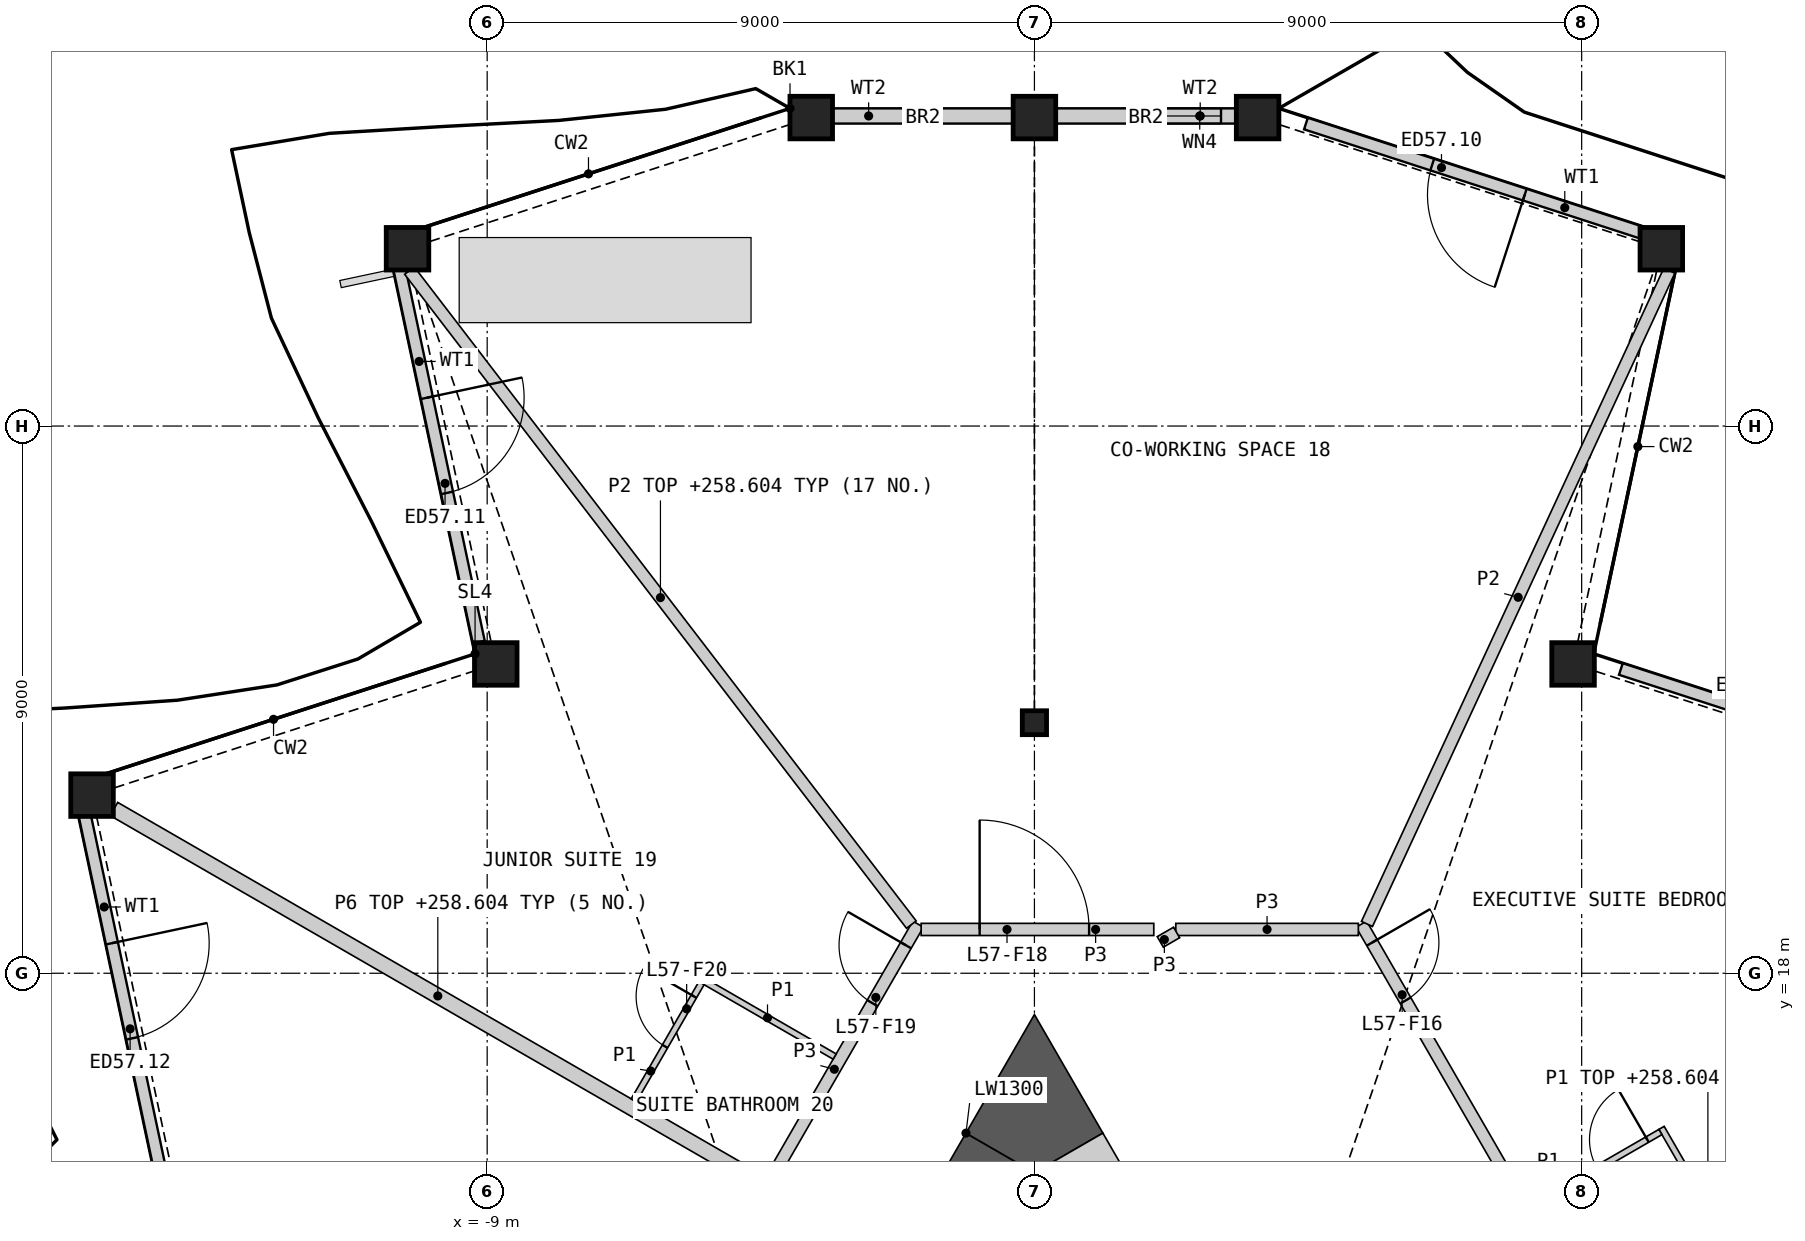
"""IFC4 building model, lengths in metres.
Left out: names, types, materials, properties, quantities, classifications, styles, units other than length and angle.
Written with IfcOpenShell. Run it as: python <this file> out.ifc"""

import sys

from ifc_helpers import new_model, si_unit, direction, frame, frame_2d, origin, origin_2d, place, context, subcontext, project, spatial, polyline, rectangle, hollow_rectangle, i_section, outline, extrude, element, fill, save


model = new_model("IFC4")
c1 = context("Model", 3, precision=1e-05, world=origin(), true_north=direction((0.0, 1.0)))
c2 = subcontext(c1, "Body", "Model", "MODEL_VIEW")
j1 = project(units=[si_unit("LENGTHUNIT", "METRE"), si_unit("PLANEANGLEUNIT", "RADIAN")], contexts=[c1])
p1 = place(None, origin())
s1 = spatial("IfcSite", under=j1, at=p1, CompositionType="ELEMENT")
p2 = place(p1, origin())
s2 = spatial("IfcBuilding", under=s1, at=p2, CompositionType="ELEMENT")
p3 = place(p2, frame((0.0, 0.0, 256.2)))
s3 = spatial("IfcBuildingStorey", under=s2, at=p3, CompositionType="ELEMENT", Elevation=256.2)
for number, where, z_axis, x_axis in (
    (1, (8.859, 23.087, 0.0), (0.0, 0.0, 1.0), (1.0, 0.0, 0.0)),
    (2, (10.31, 29.916, 0.0), (0.0, 0.0, 1.0), (1.0, 0.0, 0.0)),
    (3, (3.67, 32.073, 0.0), (0.0, 0.0, 1.0), (1.0, 0.0, 0.0)),
    (4, (0.0, 32.073, 0.0), (0.0, 0.0, 1.0), (1.0, 0.0, 0.0)),
    (5, (-3.67, 32.073, 0.0), (0.0, 0.0, 1.0), (1.0, 0.0, 0.0)),
    (6, (-10.31, 29.916, 0.0), (0.0, 0.0, 1.0), (1.0, 0.0, 0.0)),
    (7, (-8.859, 23.087, 0.0), (0.0, 0.0, 1.0), (1.0, 0.0, 0.0)),
    (8, (-15.499, 20.93, 0.0), (0.0, 0.0, 1.0), (1.0, 0.0, 0.0)),
):
    element("IfcColumn", number, at=place(p3, frame(where, z_axis=z_axis, x_axis=x_axis)), inside=s3, PredefinedType="COLUMN", context=c2, shape_type="SweptSolid", body=[
        extrude(hollow_rectangle(XDim=0.7, YDim=0.7, WallThickness=0.045, at=origin_2d()), origin(), (0.0, 0.0, 1.0), 3.6),
    ])
p4 = place(p3, frame((0.0, 22.121, 0.0), z_axis=(0.0, 0.0, 1.0), x_axis=(1.0, 0.0, 0.0)))
e9 = element("IfcColumn", 9, at=p4, inside=s3, PredefinedType="COLUMN", context=c2, shape_type="SweptSolid", body=[
    extrude(i_section(OverallWidth=0.399, OverallDepth=0.393, WebThickness=0.023, FlangeThickness=0.037, at=origin_2d()), origin(), (0.0, 0.0, 1.0), 3.6),
])
p5 = place(p3, frame((15.321, 21.159, 0.0), z_axis=(0.0, 0.0, 1.0), x_axis=(-0.951053307318, 0.309026870418, 0.0)))
e10 = element("IfcWall", 10, at=p5, inside=s3, PredefinedType="SOLIDWALL", context=c2, shape_type="SweptSolid", body=[
    extrude(rectangle(XDim=5.968, YDim=0.2, at=frame_2d((2.984, 0.0))), origin(), (0.0, 0.0, 1.0), 2.701),
])
p6 = place(p5, frame((2.184, 0.0, 0.0)))
e11 = element("IfcOpeningElement", 11, at=p6, cuts=e10, PredefinedType="OPENING", context=c2, shape_type="SweptSolid", body=[
    extrude(rectangle(XDim=1.6, YDim=2.4, at=frame_2d((0.8, 1.2))), frame((0.0, 0.11, 0.0), z_axis=(0.0, -1.0, 0.0), x_axis=(1.0, 0.0, 0.0)), (0.0, 0.0, 1.0), 0.22),
])
p7 = place(p3, frame((10.141, 30.131, 0.0), z_axis=(0.0, 0.0, 1.0), x_axis=(-0.951049400374, 0.309038894069, 0.0)))
e12 = element("IfcWall", 12, at=p7, inside=s3, PredefinedType="SOLIDWALL", context=c2, shape_type="SweptSolid", body=[
    extrude(rectangle(XDim=5.968, YDim=0.2, at=frame_2d((2.984, 0.0))), origin(), (0.0, 0.0, 1.0), 2.701),
])
p8 = place(p7, frame((2.184, 0.0, 0.0)))
e13 = element("IfcOpeningElement", 13, at=p8, cuts=e12, PredefinedType="OPENING", context=c2, shape_type="SweptSolid", body=[
    extrude(rectangle(XDim=1.6, YDim=2.4, at=frame_2d((0.8, 1.2))), frame((0.0, 0.11, 0.0), z_axis=(0.0, -1.0, 0.0), x_axis=(1.0, 0.0, 0.0)), (0.0, 0.0, 1.0), 0.22),
])
p9 = place(p3, frame((3.519, 32.1, 0.0), z_axis=(0.0, 0.0, 1.0), x_axis=(-1.0, 0.0, 0.0)))
e14 = element("IfcWall", 14, at=p9, inside=s3, PredefinedType="SOLIDWALL", context=c2, shape_type="SweptSolid", body=[
    extrude(rectangle(XDim=3.169, YDim=0.25, at=frame_2d((1.584, 0.0))), origin(), (0.0, 0.0, 1.0), 2.701),
])
p10 = place(p9, frame((0.45, 0.0, 1.8)))
e15 = element("IfcOpeningElement", 15, at=p10, cuts=e14, PredefinedType="OPENING", context=c2, shape_type="SweptSolid", body=[
    extrude(rectangle(XDim=1.4, YDim=0.7, at=frame_2d((0.7, 0.35))), frame((0.0, 0.135, 0.0), z_axis=(0.0, -1.0, 0.0), x_axis=(1.0, 0.0, 0.0)), (0.0, 0.0, 1.0), 0.27),
])
p11 = place(p3, frame((-0.35, 32.1, 0.0), z_axis=(0.0, 0.0, 1.0), x_axis=(-1.0, 0.0, 0.0)))
e16 = element("IfcWall", 16, at=p11, inside=s3, PredefinedType="SOLIDWALL", context=c2, shape_type="SweptSolid", body=[
    extrude(rectangle(XDim=3.169, YDim=0.25, at=frame_2d((1.584, 0.0))), origin(), (0.0, 0.0, 1.0), 2.701),
])
p12 = place(p3, frame((-10.446, 29.602, 0.0), z_axis=(0.0, 0.0, 1.0), x_axis=(0.207926028339, -0.97814455309, 0.0)))
e17 = element("IfcWall", 17, at=p12, inside=s3, PredefinedType="SOLIDWALL", context=c2, shape_type="SweptSolid", body=[
    extrude(rectangle(XDim=6.293, YDim=0.2, at=frame_2d((3.147, 0.0))), origin(), (0.0, 0.0, 1.0), 2.701),
])
p13 = place(p12, frame((2.184, 0.0, 0.0)))
e18 = element("IfcOpeningElement", 18, at=p13, cuts=e17, PredefinedType="OPENING", context=c2, shape_type="SweptSolid", body=[
    extrude(rectangle(XDim=1.6, YDim=2.4, at=frame_2d((0.8, 1.2))), frame((0.0, 0.11, 0.0), z_axis=(0.0, -1.0, 0.0), x_axis=(1.0, 0.0, 0.0)), (0.0, 0.0, 1.0), 0.22),
])
p14 = place(p3, frame((-15.626, 20.631, 0.0), z_axis=(0.0, 0.0, 1.0), x_axis=(0.207882853761, -0.978153729795, 0.0)))
e19 = element("IfcWall", 19, at=p14, inside=s3, PredefinedType="SOLIDWALL", context=c2, shape_type="SweptSolid", body=[
    extrude(rectangle(XDim=6.301, YDim=0.2, at=frame_2d((3.15, 0.0))), origin(), (0.0, 0.0, 1.0), 2.701),
])
p15 = place(p14, frame((2.184, 0.0, 0.0)))
e20 = element("IfcOpeningElement", 20, at=p15, cuts=e19, PredefinedType="OPENING", context=c2, shape_type="SweptSolid", body=[
    extrude(rectangle(XDim=1.6, YDim=2.4, at=frame_2d((0.8, 1.2))), frame((0.0, 0.11, 0.0), z_axis=(0.0, -1.0, 0.0), x_axis=(1.0, 0.0, 0.0)), (0.0, 0.0, 1.0), 0.22),
])
p16 = place(p3, frame((-0.563, 15.045, 0.0), z_axis=(0.0, 0.0, 1.0), x_axis=(-0.499982995661, -0.866035221021, 0.0)))
e21 = element("IfcWall", 21, at=p16, inside=s3, PredefinedType="SHEAR", context=c2, shape_type="SweptSolid", body=[
    extrude(rectangle(XDim=5.164, YDim=1.3, at=frame_2d((2.582, 0.0))), origin(), (0.0, 0.0, 1.0), 3.25),
])
p17 = place(p3, origin())
e22 = element("IfcWall", 22, at=p17, inside=s3, PredefinedType="SHEAR", context=c2, shape_type="SweptSolid", body=[
    extrude(outline(polyline([(-1.126, 15.371), (0.0, 17.321), (1.126, 15.371), (0.0, 14.72), (-1.126, 15.371)])), origin(), (0.0, 0.0, 1.0), 3.25),
])
p18 = place(p3, frame((2.14, 12.313, 0.0), z_axis=(0.0, 0.0, 1.0), x_axis=(-0.499968102766, 0.866043818878, 0.0)))
e23 = element("IfcWall", 23, at=p18, inside=s3, PredefinedType="SHEAR", context=c2, shape_type="SweptSolid", body=[
    extrude(rectangle(XDim=3.155, YDim=1.3, at=frame_2d((1.577, 0.0))), origin(), (0.0, 0.0, 1.0), 3.25),
])
p19 = place(p18, frame((0.6, 0.0, 0.0)))
e24 = element("IfcOpeningElement", 24, at=p19, cuts=e23, PredefinedType="OPENING", context=c2, shape_type="SweptSolid", body=[
    extrude(rectangle(XDim=1.0, YDim=2.1, at=frame_2d((0.5, 1.05))), frame((0.0, 0.66, 0.0), z_axis=(0.0, -1.0, 0.0), x_axis=(1.0, 0.0, 0.0)), (0.0, 0.0, 1.0), 1.32),
])
p20 = place(p3, frame((5.377, 18.807, 0.0), z_axis=(0.0, 0.0, 1.0), x_axis=(0.499999852422, -0.866025488988, 0.0)))
e25 = element("IfcWall", 25, at=p20, inside=s3, PredefinedType="PARTITIONING", context=c2, shape_type="SweptSolid", body=[
    extrude(rectangle(XDim=27.198, YDim=0.2, at=frame_2d((13.599, 0.0))), origin(), (0.0, 0.0, 1.0), 3.25),
])
p21 = place(p20, frame((25.096, 0.0, 0.0)))
e26 = element("IfcOpeningElement", 26, at=p21, cuts=e25, PredefinedType="OPENING", context=c2, shape_type="SweptSolid", body=[
    extrude(rectangle(XDim=0.95, YDim=2.1, at=frame_2d((0.475, 1.05))), frame((0.0, 0.11, 0.0), z_axis=(0.0, -1.0, 0.0), x_axis=(1.0, 0.0, 0.0)), (0.0, 0.0, 1.0), 0.22),
])
p22 = place(p20, frame((19.122, 0.0, 0.0)))
e27 = element("IfcOpeningElement", 27, at=p22, cuts=e25, PredefinedType="OPENING", context=c2, shape_type="SweptSolid", body=[
    extrude(rectangle(XDim=1.0, YDim=2.1, at=frame_2d((0.5, 1.05))), frame((0.0, 0.11, 0.0), z_axis=(0.0, -1.0, 0.0), x_axis=(1.0, 0.0, 0.0)), (0.0, 0.0, 1.0), 0.22),
])
p23 = place(p20, frame((17.115, 0.0, 0.0)))
e28 = element("IfcOpeningElement", 28, at=p23, cuts=e25, PredefinedType="OPENING", context=c2, shape_type="SweptSolid", body=[
    extrude(rectangle(XDim=1.1, YDim=2.1, at=frame_2d((0.55, 1.05))), frame((0.0, 0.11, 0.0), z_axis=(0.0, -1.0, 0.0), x_axis=(1.0, 0.0, 0.0)), (0.0, 0.0, 1.0), 0.22),
])
p24 = place(p20, frame((0.35, 0.0, 0.0)))
e29 = element("IfcOpeningElement", 29, at=p24, cuts=e25, PredefinedType="OPENING", context=c2, shape_type="SweptSolid", body=[
    extrude(rectangle(XDim=1.1, YDim=2.1, at=frame_2d((0.55, 1.05))), frame((0.0, 0.11, 0.0), z_axis=(0.0, -1.0, 0.0), x_axis=(1.0, 0.0, 0.0)), (0.0, 0.0, 1.0), 0.22),
])
p25 = place(p3, frame((-15.138, 20.702, 0.0), z_axis=(0.0, 0.0, 1.0), x_axis=(0.86602627735, -0.499998486937, 0.0)))
e30 = element("IfcWall", 30, at=p25, inside=s3, PredefinedType="PARTITIONING", context=c2, shape_type="SweptSolid", body=[
    extrude(rectangle(XDim=12.301, YDim=0.25, at=frame_2d((6.15, 0.0))), origin(), (0.0, 0.0, 1.0), 2.404),
])
p26 = place(p3, frame((-4.668, 14.035, 0.0), z_axis=(0.0, 0.0, 1.0), x_axis=(0.499984524817, 0.866034338201, 0.0)))
e31 = element("IfcWall", 31, at=p26, inside=s3, PredefinedType="PARTITIONING", context=c2, shape_type="SweptSolid", body=[
    extrude(rectangle(XDim=5.51, YDim=0.2, at=frame_2d((2.755, 0.0))), origin(), (0.0, 0.0, 1.0), 3.25),
])
p27 = place(p26, frame((4.01, 0.0, 0.0)))
e32 = element("IfcOpeningElement", 32, at=p27, cuts=e31, PredefinedType="OPENING", context=c2, shape_type="SweptSolid", body=[
    extrude(rectangle(XDim=1.1, YDim=2.1, at=frame_2d((0.55, 1.05))), frame((0.0, 0.11, 0.0), z_axis=(0.0, -1.0, 0.0), x_axis=(1.0, 0.0, 0.0)), (0.0, 0.0, 1.0), 0.22),
])
p28 = place(p3, frame((-1.863, 18.72, 0.0), z_axis=(0.0, 0.0, 1.0), x_axis=(1.0, 0.0, 0.0)))
e33 = element("IfcWall", 33, at=p28, inside=s3, PredefinedType="PARTITIONING", context=c2, shape_type="SweptSolid", body=[
    extrude(rectangle(XDim=3.826, YDim=0.2, at=frame_2d((1.913, 0.0))), origin(), (0.0, 0.0, 1.0), 3.25),
])
p29 = place(p28, frame((0.962, 0.0, 0.0)))
e34 = element("IfcOpeningElement", 34, at=p29, cuts=e33, PredefinedType="OPENING", context=c2, shape_type="SweptSolid", body=[
    extrude(rectangle(XDim=1.8, YDim=2.1, at=frame_2d((0.9, 1.05))), frame((0.0, 0.11, 0.0), z_axis=(0.0, -1.0, 0.0), x_axis=(1.0, 0.0, 0.0)), (0.0, 0.0, 1.0), 0.22),
])
p30 = place(p3, frame((2.325, 18.72, 0.0), z_axis=(0.0, 0.0, 1.0), x_axis=(1.0, 0.0, 0.0)))
e35 = element("IfcWall", 35, at=p30, inside=s3, PredefinedType="PARTITIONING", context=c2, shape_type="SweptSolid", body=[
    extrude(rectangle(XDim=3.002, YDim=0.2, at=frame_2d((1.501, 0.0))), origin(), (0.0, 0.0, 1.0), 3.25),
])
p31 = place(p3, frame((2.07, 18.515, 0.0), z_axis=(0.0, 0.0, 1.0), x_axis=(0.866054481515, 0.499949632511, 0.0)))
e36 = element("IfcWall", 36, at=p31, inside=s3, PredefinedType="PARTITIONING", context=c2, shape_type="SweptSolid", body=[
    extrude(rectangle(XDim=0.31, YDim=0.2, at=frame_2d((0.155, 0.0))), origin(), (0.0, 0.0, 1.0), 3.25),
])
p32 = place(p3, frame((-10.277, 29.556, 0.0), z_axis=(0.0, 0.0, 1.0), x_axis=(0.60876001101, -0.793354428358, 0.0)))
e37 = element("IfcWall", 37, at=p32, inside=s3, PredefinedType="PARTITIONING", context=c2, shape_type="SweptSolid", body=[
    extrude(rectangle(XDim=13.558, YDim=0.2, at=frame_2d((6.779, 0.0))), origin(), (0.0, 0.0, 1.0), 2.404),
])
p33 = place(p3, frame((5.469, 18.811, 0.0), z_axis=(0.0, 0.0, 1.0), x_axis=(0.419996836618, 0.907525568362, 0.0)))
e38 = element("IfcWall", 38, at=p33, inside=s3, PredefinedType="PARTITIONING", context=c2, shape_type="SweptSolid", body=[
    extrude(rectangle(XDim=11.84, YDim=0.2, at=frame_2d((5.92, 0.0))), origin(), (0.0, 0.0, 1.0), 2.404),
])
p34 = place(p3, frame((10.313, 15.457, 0.0), z_axis=(0.0, 0.0, 1.0), x_axis=(0.499978833458, -0.866037623948, 0.0)))
e39 = element("IfcWall", 39, at=p34, inside=s3, PredefinedType="PARTITIONING", context=c2, shape_type="SweptSolid", body=[
    extrude(rectangle(XDim=6.1, YDim=0.1, at=frame_2d((3.05, 0.0))), origin(), (0.0, 0.0, 1.0), 2.404),
])
p35 = place(p3, frame((8.173, 14.164, 0.0), z_axis=(0.0, 0.0, 1.0), x_axis=(0.866014668023, 0.500018594424, 0.0)))
e40 = element("IfcWall", 40, at=p35, inside=s3, PredefinedType="PARTITIONING", context=c2, shape_type="SweptSolid", body=[
    extrude(rectangle(XDim=2.45, YDim=0.1, at=frame_2d((1.225, 0.0))), origin(), (0.0, 0.0, 1.0), 2.404),
])
p36 = place(p35, frame((1.25, 0.0, 0.0)))
e41 = element("IfcOpeningElement", 41, at=p36, cuts=e40, PredefinedType="OPENING", context=c2, shape_type="SweptSolid", body=[
    extrude(rectangle(XDim=0.95, YDim=2.1, at=frame_2d((0.475, 1.05))), frame((0.0, 0.06, 0.0), z_axis=(0.0, -1.0, 0.0), x_axis=(1.0, 0.0, 0.0)), (0.0, 0.0, 1.0), 0.12),
])
p37 = place(p3, frame((-5.494, 17.905, 0.0), z_axis=(0.0, 0.0, 1.0), x_axis=(0.866030925526, -0.499990435942, 0.0)))
e42 = element("IfcWall", 42, at=p37, inside=s3, PredefinedType="PARTITIONING", context=c2, shape_type="SweptSolid", body=[
    extrude(rectangle(XDim=2.55, YDim=0.1, at=frame_2d((1.275, 0.0))), origin(), (0.0, 0.0, 1.0), 2.404),
])
p38 = place(p3, frame((-6.588, 15.909, 0.0), z_axis=(0.0, 0.0, 1.0), x_axis=(0.49999788721, 0.866026623601, 0.0)))
e43 = element("IfcWall", 43, at=p38, inside=s3, PredefinedType="PARTITIONING", context=c2, shape_type="SweptSolid", body=[
    extrude(rectangle(XDim=2.225, YDim=0.1, at=frame_2d((1.113, 0.0))), origin(), (0.0, 0.0, 1.0), 2.404),
])
p39 = place(p38, frame((1.025, 0.0, 0.0)))
e44 = element("IfcOpeningElement", 44, at=p39, cuts=e43, PredefinedType="OPENING", context=c2, shape_type="SweptSolid", body=[
    extrude(rectangle(XDim=0.95, YDim=2.1, at=frame_2d((0.475, 1.05))), frame((0.0, 0.06, 0.0), z_axis=(0.0, -1.0, 0.0), x_axis=(1.0, 0.0, 0.0)), (0.0, 0.0, 1.0), 0.12),
])
p40 = place(p8, origin())
e45 = element("IfcDoor", 45, at=p40, inside=s3, OperationType="DOUBLE_DOOR_SINGLE_SWING", PredefinedType="DOOR", context=c2, shape_type="SweptSolid", body=[
    extrude(rectangle(XDim=1.6, YDim=2.4, at=frame_2d((0.8, 1.2))), frame((0.0, 0.025, 0.0), z_axis=(0.0, -1.0, 0.0), x_axis=(1.0, 0.0, 0.0)), (0.0, 0.0, 1.0), 0.05),
])
fill(e13, e45)
p41 = place(p10, origin())
e46 = element("IfcWindow", 46, at=p41, inside=s3, PartitioningType="SINGLE_PANEL", PredefinedType="WINDOW", context=c2, shape_type="SweptSolid", body=[
    extrude(rectangle(XDim=1.4, YDim=0.7, at=frame_2d((0.7, 0.35))), frame((0.0, 0.03, 0.0), z_axis=(0.0, -1.0, 0.0), x_axis=(1.0, 0.0, 0.0)), (0.0, 0.0, 1.0), 0.06),
])
fill(e15, e46)
p42 = place(p13, origin())
e47 = element("IfcDoor", 47, at=p42, inside=s3, OperationType="DOUBLE_DOOR_SINGLE_SWING", PredefinedType="DOOR", context=c2, shape_type="SweptSolid", body=[
    extrude(rectangle(XDim=1.6, YDim=2.4, at=frame_2d((0.8, 1.2))), frame((0.0, 0.025, 0.0), z_axis=(0.0, -1.0, 0.0), x_axis=(1.0, 0.0, 0.0)), (0.0, 0.0, 1.0), 0.05),
])
fill(e18, e47)
p43 = place(p15, origin())
e48 = element("IfcDoor", 48, at=p43, inside=s3, OperationType="DOUBLE_DOOR_SINGLE_SWING", PredefinedType="DOOR", context=c2, shape_type="SweptSolid", body=[
    extrude(rectangle(XDim=1.6, YDim=2.4, at=frame_2d((0.8, 1.2))), frame((0.0, 0.025, 0.0), z_axis=(0.0, -1.0, 0.0), x_axis=(1.0, 0.0, 0.0)), (0.0, 0.0, 1.0), 0.05),
])
fill(e20, e48)
p44 = place(p24, origin())
e49 = element("IfcDoor", 49, at=p44, inside=s3, OperationType="SINGLE_SWING_LEFT", PredefinedType="DOOR", context=c2, shape_type="SweptSolid", body=[
    extrude(rectangle(XDim=1.1, YDim=2.1, at=frame_2d((0.55, 1.05))), frame((0.0, 0.025, 0.0), z_axis=(0.0, -1.0, 0.0), x_axis=(1.0, 0.0, 0.0)), (0.0, 0.0, 1.0), 0.05),
])
fill(e29, e49)
p45 = place(p36, origin())
e50 = element("IfcDoor", 50, at=p45, inside=s3, OperationType="SINGLE_SWING_RIGHT", PredefinedType="DOOR", context=c2, shape_type="SweptSolid", body=[
    extrude(rectangle(XDim=0.95, YDim=2.1, at=frame_2d((0.475, 1.05))), frame((0.0, 0.025, 0.0), z_axis=(0.0, -1.0, 0.0), x_axis=(1.0, 0.0, 0.0)), (0.0, 0.0, 1.0), 0.05),
])
fill(e41, e50)
p46 = place(p29, origin())
e51 = element("IfcDoor", 51, at=p46, inside=s3, OperationType="DOUBLE_DOOR_SINGLE_SWING", PredefinedType="DOOR", context=c2, shape_type="SweptSolid", body=[
    extrude(rectangle(XDim=1.8, YDim=2.1, at=frame_2d((0.9, 1.05))), frame((0.0, 0.025, 0.0), z_axis=(0.0, -1.0, 0.0), x_axis=(1.0, 0.0, 0.0)), (0.0, 0.0, 1.0), 0.05),
])
fill(e34, e51)
p47 = place(p27, origin())
e52 = element("IfcDoor", 52, at=p47, inside=s3, OperationType="SINGLE_SWING_RIGHT", PredefinedType="DOOR", context=c2, shape_type="SweptSolid", body=[
    extrude(rectangle(XDim=1.1, YDim=2.1, at=frame_2d((0.55, 1.05))), frame((0.0, 0.025, 0.0), z_axis=(0.0, -1.0, 0.0), x_axis=(1.0, 0.0, 0.0)), (0.0, 0.0, 1.0), 0.05),
])
fill(e32, e52)
p48 = place(p39, origin())
e53 = element("IfcDoor", 53, at=p48, inside=s3, OperationType="SINGLE_SWING_RIGHT", PredefinedType="DOOR", context=c2, shape_type="SweptSolid", body=[
    extrude(rectangle(XDim=0.95, YDim=2.1, at=frame_2d((0.475, 1.05))), frame((0.0, 0.025, 0.0), z_axis=(0.0, -1.0, 0.0), x_axis=(1.0, 0.0, 0.0)), (0.0, 0.0, 1.0), 0.05),
])
fill(e44, e53)
save(model, sys.argv[1])
